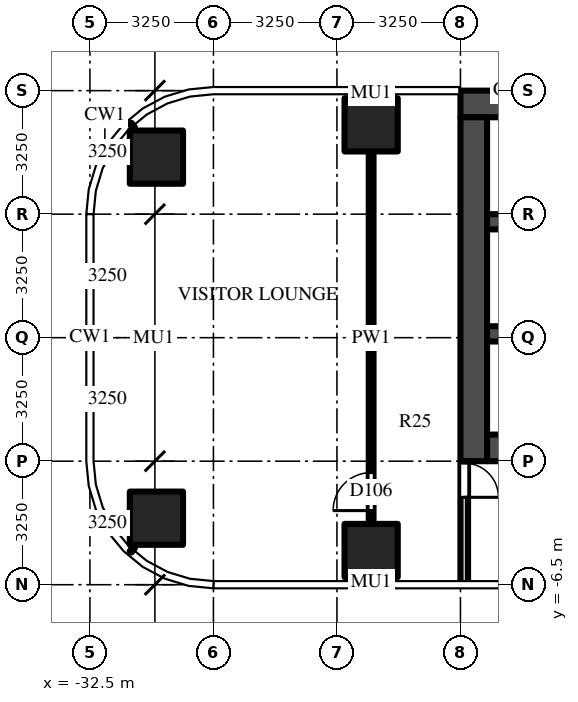
"""IFC4 building model, lengths in metres.
Left out: names, types, materials, properties, quantities, classifications, styles, units other than length and angle.
Written with IfcOpenShell. Run it as: python <this file> out.ifc"""

import sys

from ifc_helpers import new_model, si_unit, direction, frame, frame_2d, origin, origin_2d, place, context, subcontext, project, spatial, rectangle, extrude, source, transform, mapped, element, fill, save


model = new_model("IFC4")
c1 = context("Model", 3, precision=1e-05, world=origin(), true_north=direction((0.0, 1.0)))
c2 = subcontext(c1, "Body", "Model", "MODEL_VIEW")
j1 = project(units=[si_unit("LENGTHUNIT", "METRE"), si_unit("PLANEANGLEUNIT", "RADIAN")], contexts=[c1])
p1 = place(None, origin())
s1 = spatial("IfcSite", under=j1, at=p1, CompositionType="ELEMENT")
p2 = place(p1, origin())
s2 = spatial("IfcBuilding", under=s1, at=p2, CompositionType="ELEMENT")
p3 = place(p2, frame((0.0, 0.0, 52.0)))
s3 = spatial("IfcBuildingStorey", under=s2, at=p3, CompositionType="ELEMENT", Elevation=52.0)
m1 = source(origin(), c2, "Body", "SweptSolid", [
    extrude(rectangle(XDim=1.4, YDim=1.4, at=origin_2d()), origin(), (0.0, 0.0, 1.0), 4.5),
])
for number, where, z_axis, x_axis in (
    (1, (-25.1, -5.6, 0.0), (0.0, 0.0, 1.0), (1.0, 0.0, 0.0)),
    (2, (-30.75, -4.75, 0.0), (0.0, 0.0, 1.0), (1.0, 0.0, 0.0)),
    (3, (-25.1, 5.6, 0.0), (0.0, 0.0, 1.0), (1.0, 0.0, 0.0)),
    (4, (-30.75, 4.75, 0.0), (0.0, 0.0, 1.0), (1.0, 0.0, 0.0)),
):
    element("IfcColumn", number, at=place(p3, frame(where, z_axis=z_axis, x_axis=x_axis)), inside=s3, PredefinedType="COLUMN", context=c2, shape_type="MappedRepresentation", body=[
        mapped(m1, transform((0.0, 0.0, 0.0))),
    ])
m2 = source(origin(), c2, "Body", "SweptSolid", [
    extrude(rectangle(XDim=16.45, YDim=0.7, at=frame_2d((8.225, 0.0))), origin(), (0.0, 0.0, 1.0), 4.25),
])
p4 = place(p3, frame((-6.3, 6.15, 0.0), z_axis=(0.0, 0.0, 1.0), x_axis=(-1.0, 0.0, 0.0)))
e5 = element("IfcWall", 5, at=p4, inside=s3, PredefinedType="SHEAR", context=c2, shape_type="MappedRepresentation", body=[
    mapped(m2, transform((0.0, 0.0, 0.0))),
])
m3 = source(origin(), c2, "Body", "SweptSolid", [
    extrude(rectangle(XDim=14.85, YDim=0.7, at=frame_2d((7.425, 0.0))), origin(), (0.0, 0.0, 1.0), 4.25),
])
p5 = place(p3, frame((-7.2, -2.9, 0.0), z_axis=(0.0, 0.0, 1.0), x_axis=(-1.0, 0.0, 0.0)))
e6 = element("IfcWall", 6, at=p5, inside=s3, PredefinedType="SHEAR", context=c2, shape_type="MappedRepresentation", body=[
    mapped(m3, transform((0.0, 0.0, 0.0))),
])
m4 = source(origin(), c2, "Body", "SweptSolid", [
    extrude(rectangle(XDim=1.3, YDim=2.1, at=frame_2d((0.65, 1.05))), frame((0.0, 0.36, 0.0), z_axis=(0.0, -1.0, 0.0), x_axis=(1.0, 0.0, 0.0)), (0.0, 0.0, 1.0), 0.72),
])
p6 = place(p5, frame((12.2, 0.0, 0.0)))
e7 = element("IfcOpeningElement", 7, at=p6, cuts=e6, PredefinedType="OPENING", context=c2, shape_type="MappedRepresentation", body=[
    mapped(m4, transform((0.0, 0.0, 0.0))),
])
m5 = source(origin(), c2, "Body", "SweptSolid", [
    extrude(rectangle(XDim=1.2, YDim=2.1, at=frame_2d((0.6, 1.05))), frame((0.0, 0.36, 0.0), z_axis=(0.0, -1.0, 0.0), x_axis=(1.0, 0.0, 0.0)), (0.0, 0.0, 1.0), 0.72),
])
p7 = place(p5, frame((9.85, 0.0, 0.0)))
e8 = element("IfcOpeningElement", 8, at=p7, cuts=e6, PredefinedType="OPENING", context=c2, shape_type="MappedRepresentation", body=[
    mapped(m5, transform((0.0, 0.0, 0.0))),
])
m6 = source(origin(), c2, "Body", "SweptSolid", [
    extrude(rectangle(XDim=1.0, YDim=2.1, at=frame_2d((0.5, 1.05))), frame((0.0, 0.36, 0.0), z_axis=(0.0, -1.0, 0.0), x_axis=(1.0, 0.0, 0.0)), (0.0, 0.0, 1.0), 0.72),
])
p8 = place(p5, frame((7.9, 0.0, 0.0)))
e9 = element("IfcOpeningElement", 9, at=p8, cuts=e6, PredefinedType="OPENING", context=c2, shape_type="MappedRepresentation", body=[
    mapped(m6, transform((0.0, 0.0, 0.0))),
])
m7 = source(origin(), c2, "Body", "SweptSolid", [
    extrude(rectangle(XDim=0.8, YDim=2.1, at=frame_2d((0.4, 1.05))), frame((0.0, 0.36, 0.0), z_axis=(0.0, -1.0, 0.0), x_axis=(1.0, 0.0, 0.0)), (0.0, 0.0, 1.0), 0.72),
])
p9 = place(p5, frame((0.113, 0.0, 0.0)))
e10 = element("IfcOpeningElement", 10, at=p9, cuts=e6, PredefinedType="OPENING", context=c2, shape_type="MappedRepresentation", body=[
    mapped(m7, transform((0.0, 0.0, 0.0))),
])
p10 = place(p5, frame((1.288, 0.0, 0.0)))
e11 = element("IfcOpeningElement", 11, at=p10, cuts=e6, PredefinedType="OPENING", context=c2, shape_type="MappedRepresentation", body=[
    mapped(m7, transform((0.0, 0.0, 0.0))),
])
p11 = place(p5, frame((2.712, 0.0, 0.0)))
e12 = element("IfcOpeningElement", 12, at=p11, cuts=e6, PredefinedType="OPENING", context=c2, shape_type="MappedRepresentation", body=[
    mapped(m7, transform((0.0, 0.0, 0.0))),
])
p12 = place(p5, frame((3.887, 0.0, 0.0)))
e13 = element("IfcOpeningElement", 13, at=p12, cuts=e6, PredefinedType="OPENING", context=c2, shape_type="MappedRepresentation", body=[
    mapped(m7, transform((0.0, 0.0, 0.0))),
])
p13 = place(p5, frame((5.312, 0.0, 0.0)))
e14 = element("IfcOpeningElement", 14, at=p13, cuts=e6, PredefinedType="OPENING", context=c2, shape_type="MappedRepresentation", body=[
    mapped(m7, transform((0.0, 0.0, 0.0))),
])
p14 = place(p5, frame((6.488, 0.0, 0.0)))
e15 = element("IfcOpeningElement", 15, at=p14, cuts=e6, PredefinedType="OPENING", context=c2, shape_type="MappedRepresentation", body=[
    mapped(m7, transform((0.0, 0.0, 0.0))),
])
m8 = source(origin(), c2, "Body", "SweptSolid", [
    extrude(rectangle(XDim=9.05, YDim=0.7, at=frame_2d((4.525, 0.0))), origin(), (0.0, 0.0, 1.0), 4.25),
])
p15 = place(p3, frame((-22.4, 5.8, 0.0), z_axis=(0.0, 0.0, 1.0), x_axis=(0.0, -1.0, 0.0)))
e16 = element("IfcWall", 16, at=p15, inside=s3, PredefinedType="SHEAR", context=c2, shape_type="MappedRepresentation", body=[
    mapped(m8, transform((0.0, 0.0, 0.0))),
])
m9 = source(origin(), c2, "Body", "SweptSolid", [
    extrude(rectangle(XDim=14.85, YDim=0.4, at=frame_2d((7.425, 0.0))), origin(), (0.0, 0.0, 1.0), 4.25),
])
p16 = place(p3, frame((-7.2, 0.1, 0.0), z_axis=(0.0, 0.0, 1.0), x_axis=(-1.0, 0.0, 0.0)))
e17 = element("IfcWall", 17, at=p16, inside=s3, PredefinedType="SHEAR", context=c2, shape_type="MappedRepresentation", body=[
    mapped(m9, transform((0.0, 0.0, 0.0))),
])
m10 = source(origin(), c2, "Body", "SweptSolid", [
    extrude(rectangle(XDim=1.0, YDim=2.1, at=frame_2d((0.5, 1.05))), frame((0.0, 0.21, 0.0), z_axis=(0.0, -1.0, 0.0), x_axis=(1.0, 0.0, 0.0)), (0.0, 0.0, 1.0), 0.42),
])
p17 = place(p16, frame((7.9, 0.0, 0.0)))
e18 = element("IfcOpeningElement", 18, at=p17, cuts=e17, PredefinedType="OPENING", context=c2, shape_type="MappedRepresentation", body=[
    mapped(m10, transform((0.0, 0.0, 0.0))),
])
m11 = source(origin(), c2, "Body", "SweptSolid", [
    extrude(rectangle(XDim=5.7, YDim=0.4, at=frame_2d((2.85, 0.0))), origin(), (0.0, 0.0, 1.0), 4.25),
])
p18 = place(p3, frame((-16.35, 3.05, 0.0), z_axis=(0.0, 0.0, 1.0), x_axis=(-1.0, 0.0, 0.0)))
e19 = element("IfcWall", 19, at=p18, inside=s3, PredefinedType="SHEAR", context=c2, shape_type="MappedRepresentation", body=[
    mapped(m11, transform((0.0, 0.0, 0.0))),
])
m12 = source(origin(), c2, "Body", "SweptSolid", [
    extrude(rectangle(XDim=3.25, YDim=0.2, at=frame_2d((1.625, 0.0))), origin(), (0.0, 0.0, 1.0), 4.25),
])
p19 = place(p3, frame((-22.65, -3.25, 0.0), z_axis=(0.0, 0.0, 1.0), x_axis=(0.0, -1.0, 0.0)))
e20 = element("IfcWall", 20, at=p19, inside=s3, PredefinedType="PARTITIONING", context=c2, shape_type="MappedRepresentation", body=[
    mapped(m12, transform((0.0, 0.0, 0.0))),
])
m13 = source(origin(), c2, "Body", "SweptSolid", [
    extrude(rectangle(XDim=0.9, YDim=2.1, at=frame_2d((0.45, 1.05))), frame((0.0, 0.11, 0.0), z_axis=(0.0, -1.0, 0.0), x_axis=(1.0, 0.0, 0.0)), (0.0, 0.0, 1.0), 0.22),
])
p20 = place(p19, frame((0.05, 0.0, 0.0)))
e21 = element("IfcOpeningElement", 21, at=p20, cuts=e20, PredefinedType="OPENING", context=c2, shape_type="MappedRepresentation", body=[
    mapped(m13, transform((0.0, 0.0, 0.0))),
])
m14 = source(origin(), c2, "Body", "SweptSolid", [
    extrude(rectangle(XDim=9.8, YDim=0.125, at=frame_2d((4.9, 0.0))), origin(), (0.0, 0.0, 1.0), 3.468),
])
p21 = place(p3, frame((-25.1, -4.9, 0.0), z_axis=(0.0, 0.0, 1.0), x_axis=(0.0, 1.0, 0.0)))
e22 = element("IfcWall", 22, at=p21, inside=s3, PredefinedType="PARTITIONING", context=c2, shape_type="MappedRepresentation", body=[
    mapped(m14, transform((0.0, 0.0, 0.0))),
])
m15 = source(origin(), c2, "Body", "SweptSolid", [
    extrude(rectangle(XDim=1.0, YDim=2.1, at=frame_2d((0.5, 1.05))), frame((0.0, 0.073, 0.0), z_axis=(0.0, -1.0, 0.0), x_axis=(1.0, 0.0, 0.0)), (0.0, 0.0, 1.0), 0.145),
])
p22 = place(p21, frame((0.35, 0.0, 0.0)))
e23 = element("IfcOpeningElement", 23, at=p22, cuts=e22, PredefinedType="OPENING", context=c2, shape_type="MappedRepresentation", body=[
    mapped(m15, transform((0.0, 0.0, 0.0))),
])
m16 = source(origin(), c2, "Body", "SweptSolid", [
    extrude(rectangle(XDim=0.9, YDim=2.1, at=frame_2d((0.45, 1.05))), frame((0.0, 0.025, 0.0), z_axis=(0.0, -1.0, 0.0), x_axis=(1.0, 0.0, 0.0)), (0.0, 0.0, 1.0), 0.05),
])
p23 = place(p20, origin())
e24 = element("IfcDoor", 24, at=p23, inside=s3, OperationType="SINGLE_SWING_RIGHT", PredefinedType="DOOR", context=c2, shape_type="MappedRepresentation", body=[
    mapped(m16, transform((0.0, 0.0, 0.0))),
])
fill(e21, e24)
m17 = source(origin(), c2, "Body", "SweptSolid", [
    extrude(rectangle(XDim=1.0, YDim=2.1, at=frame_2d((0.5, 1.05))), frame((0.0, 0.025, 0.0), z_axis=(0.0, -1.0, 0.0), x_axis=(1.0, 0.0, 0.0)), (0.0, 0.0, 1.0), 0.05),
])
p24 = place(p22, origin())
e25 = element("IfcDoor", 25, at=p24, inside=s3, OperationType="SINGLE_SWING_LEFT", PredefinedType="DOOR", context=c2, shape_type="MappedRepresentation", body=[
    mapped(m17, transform((0.0, 0.0, 0.0))),
])
fill(e23, e25)
save(model, sys.argv[1])
